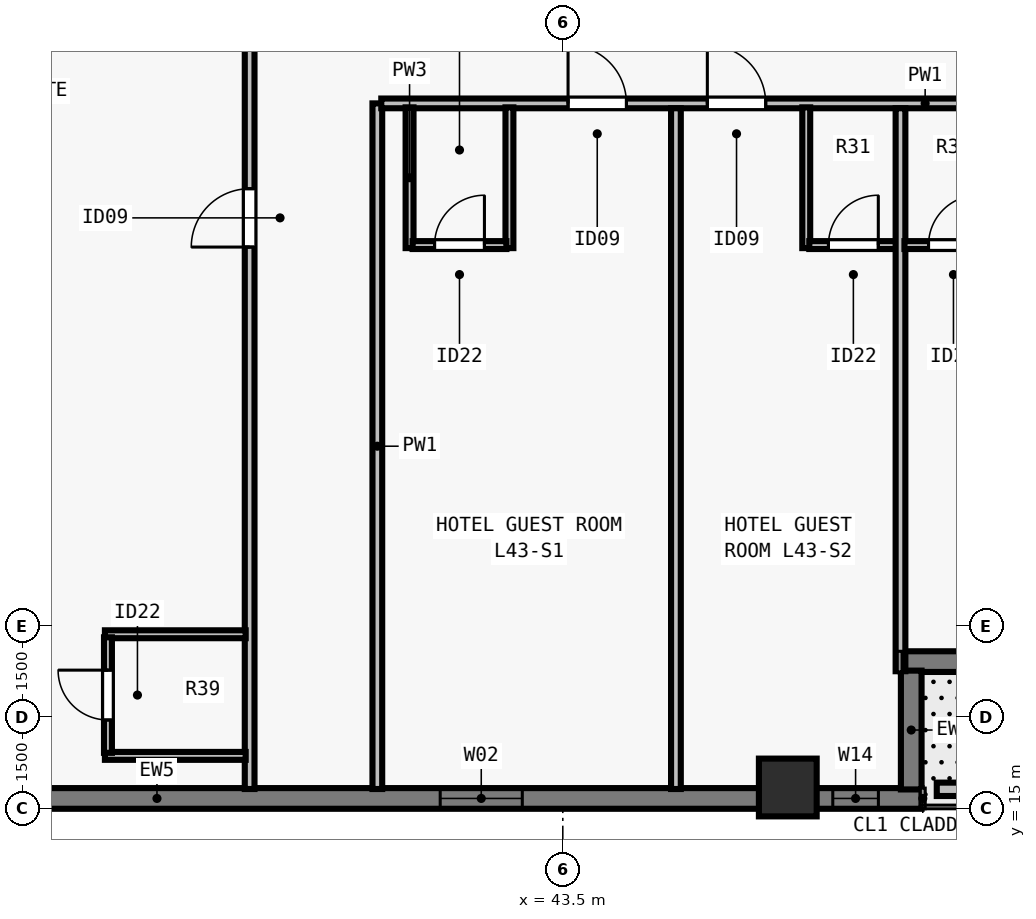
"""IFC4 building model, lengths in metres.
Left out: names, types, materials, properties, quantities, classifications, styles, units other than length and angle.
Written with IfcOpenShell. Run it as: python <this file> out.ifc"""

import sys

from ifc_helpers import new_model, si_unit, direction, frame, frame_2d, origin, origin_2d, place, context, subcontext, project, spatial, rectangle, extrude, element, fill, save


model = new_model("IFC4")
c1 = context("Model", 3, precision=1e-05, world=origin(), true_north=direction((0.0, 1.0)))
c2 = subcontext(c1, "Body", "Model", "MODEL_VIEW")
j1 = project(units=[si_unit("LENGTHUNIT", "METRE"), si_unit("PLANEANGLEUNIT", "RADIAN")], contexts=[c1])
p1 = place(None, origin())
s1 = spatial("IfcSite", under=j1, at=p1, CompositionType="ELEMENT")
p2 = place(p1, origin())
s2 = spatial("IfcBuilding", under=s1, at=p2, CompositionType="ELEMENT")
p3 = place(p2, frame((0.0, 0.0, 158.5)))
s3 = spatial("IfcBuildingStorey", under=s2, at=p3, CompositionType="ELEMENT", Elevation=158.5)
p4 = place(p3, frame((47.2, 15.35, 0.0), z_axis=(0.0, 0.0, 1.0), x_axis=(1.0, 0.0, 0.0)))
e1 = element("IfcColumn", 1, at=p4, inside=s3, PredefinedType="COLUMN", context=c2, shape_type="SweptSolid", body=[
    extrude(rectangle(XDim=0.95, YDim=0.95, at=origin_2d()), origin(), (0.0, 0.0, 1.0), 3.5),
])
p5 = place(p3, frame((49.4, 15.17, 0.0), z_axis=(0.0, 0.0, 1.0), x_axis=(-1.0, 0.0, 0.0)))
e2 = element("IfcWall", 2, at=p5, inside=s3, PredefinedType="SOLIDWALL", context=c2, shape_type="SweptSolid", body=[
    extrude(rectangle(XDim=17.082, YDim=0.34, at=frame_2d((8.541, 0.0))), origin(), (0.0, 0.0, 1.0), 3.28),
])
p6 = place(p5, frame((6.566, 0.0, 0.8)))
e3 = element("IfcOpeningElement", 3, at=p6, cuts=e2, PredefinedType="OPENING", context=c2, shape_type="SweptSolid", body=[
    extrude(rectangle(XDim=1.35, YDim=1.66, at=frame_2d((0.675, 0.83))), frame((0.0, 0.18, 0.0), z_axis=(0.0, -1.0, 0.0), x_axis=(1.0, 0.0, 0.0)), (0.0, 0.0, 1.0), 0.36),
])
p7 = place(p5, frame((0.71, 0.0, 0.8)))
e4 = element("IfcOpeningElement", 4, at=p7, cuts=e2, PredefinedType="OPENING", context=c2, shape_type="SweptSolid", body=[
    extrude(rectangle(XDim=0.75, YDim=1.66, at=frame_2d((0.375, 0.83))), frame((0.0, 0.18, 0.0), z_axis=(0.0, -1.0, 0.0), x_axis=(1.0, 0.0, 0.0)), (0.0, 0.0, 1.0), 0.36),
])
p8 = place(p3, frame((56.222, 17.42, 0.0), z_axis=(0.0, 0.0, 1.0), x_axis=(-1.0, 0.0, 0.0)))
e5 = element("IfcWall", 5, at=p8, inside=s3, PredefinedType="SOLIDWALL", context=c2, shape_type="SweptSolid", body=[
    extrude(rectangle(XDim=7.162, YDim=0.34, at=frame_2d((3.581, 0.0))), origin(), (0.0, 0.0, 1.0), 3.28),
])
p9 = place(p8, frame((3.779, 0.0, 0.0)))
e6 = element("IfcOpeningElement", 6, at=p9, cuts=e5, PredefinedType="OPENING", context=c2, shape_type="SweptSolid", body=[
    extrude(rectangle(XDim=1.0, YDim=2.15, at=frame_2d((0.5, 1.075))), frame((0.0, 0.18, 0.0), z_axis=(0.0, -1.0, 0.0), x_axis=(1.0, 0.0, 0.0)), (0.0, 0.0, 1.0), 0.36),
])
p10 = place(p3, frame((49.23, 17.272, 0.0), z_axis=(0.0, 0.0, 1.0), x_axis=(0.0, -1.0, 0.0)))
e7 = element("IfcWall", 7, at=p10, inside=s3, PredefinedType="SOLIDWALL", context=c2, shape_type="SweptSolid", body=[
    extrude(rectangle(XDim=1.954, YDim=0.34, at=frame_2d((0.977, 0.0))), origin(), (0.0, 0.0, 1.0), 3.28),
])
p11 = place(p3, frame((49.65, 15.32, 0.0), z_axis=(0.0, 0.0, 1.0), x_axis=(1.0, 0.0, 0.0)))
e8 = element("IfcWall", 8, at=p11, inside=s3, PredefinedType="PARAPET", context=c2, shape_type="SweptSolid", body=[
    extrude(rectangle(XDim=1.3, YDim=0.22, at=frame_2d((0.65, 0.0))), origin(), (0.0, 0.0, 1.0), 0.55),
])
p12 = place(p3, frame((38.35, 15.325, 0.0), z_axis=(0.0, 0.0, 1.0), x_axis=(0.0, 1.0, 0.0)))
e9 = element("IfcWall", 9, at=p12, inside=s3, PredefinedType="PARTITIONING", context=c2, shape_type="SweptSolid", body=[
    extrude(rectangle(XDim=47.35, YDim=0.16, at=frame_2d((23.675, 0.0))), origin(), (0.0, 0.0, 1.0), 2.555),
])
p13 = place(p12, frame((8.912, 0.0, 0.0)))
e10 = element("IfcOpeningElement", 10, at=p13, cuts=e9, PredefinedType="OPENING", context=c2, shape_type="SweptSolid", body=[
    extrude(rectangle(XDim=0.96, YDim=2.15, at=frame_2d((0.48, 1.075))), frame((0.0, 0.09, 0.0), z_axis=(0.0, -1.0, 0.0), x_axis=(1.0, 0.0, 0.0)), (0.0, 0.0, 1.0), 0.18),
])
p14 = place(p12, frame((24.312, 0.0, 0.0)))
e11 = element("IfcOpeningElement", 11, at=p14, cuts=e9, PredefinedType="OPENING", context=c2, shape_type="SweptSolid", body=[
    extrude(rectangle(XDim=0.96, YDim=2.15, at=frame_2d((0.48, 1.075))), frame((0.0, 0.09, 0.0), z_axis=(0.0, -1.0, 0.0), x_axis=(1.0, 0.0, 0.0)), (0.0, 0.0, 1.0), 0.18),
])
p15 = place(p12, frame((39.895, 0.0, 0.0)))
e12 = element("IfcOpeningElement", 12, at=p15, cuts=e9, PredefinedType="OPENING", context=c2, shape_type="SweptSolid", body=[
    extrude(rectangle(XDim=0.96, YDim=2.15, at=frame_2d((0.48, 1.075))), frame((0.0, 0.09, 0.0), z_axis=(0.0, -1.0, 0.0), x_axis=(1.0, 0.0, 0.0)), (0.0, 0.0, 1.0), 0.18),
])
p16 = place(p3, frame((40.45, 15.325, 0.0), z_axis=(0.0, 0.0, 1.0), x_axis=(0.0, 1.0, 0.0)))
e13 = element("IfcWall", 13, at=p16, inside=s3, PredefinedType="PARTITIONING", context=c2, shape_type="SweptSolid", body=[
    extrude(rectangle(XDim=11.275, YDim=0.16, at=frame_2d((5.638, 0.0))), origin(), (0.0, 0.0, 1.0), 2.555),
])
p17 = place(p3, frame((40.515, 26.6, 0.0), z_axis=(0.0, 0.0, 1.0), x_axis=(1.0, 0.0, 0.0)))
e14 = element("IfcWall", 14, at=p17, inside=s3, PredefinedType="PARTITIONING", context=c2, shape_type="SweptSolid", body=[
    extrude(rectangle(XDim=22.07, YDim=0.16, at=frame_2d((11.035, 0.0))), origin(), (0.0, 0.0, 1.0), 3.28),
])
p18 = place(p17, frame((3.072, 0.0, 0.0)))
e15 = element("IfcOpeningElement", 15, at=p18, cuts=e14, PredefinedType="OPENING", context=c2, shape_type="SweptSolid", body=[
    extrude(rectangle(XDim=0.96, YDim=2.15, at=frame_2d((0.48, 1.075))), frame((0.0, 0.09, 0.0), z_axis=(0.0, -1.0, 0.0), x_axis=(1.0, 0.0, 0.0)), (0.0, 0.0, 1.0), 0.18),
])
p19 = place(p17, frame((5.362, 0.0, 0.0)))
e16 = element("IfcOpeningElement", 16, at=p19, cuts=e14, PredefinedType="OPENING", context=c2, shape_type="SweptSolid", body=[
    extrude(rectangle(XDim=0.96, YDim=2.15, at=frame_2d((0.48, 1.075))), frame((0.0, 0.09, 0.0), z_axis=(0.0, -1.0, 0.0), x_axis=(1.0, 0.0, 0.0)), (0.0, 0.0, 1.0), 0.18),
])
p20 = place(p17, frame((11.566, 0.0, 0.0)))
e17 = element("IfcOpeningElement", 17, at=p20, cuts=e14, PredefinedType="OPENING", context=c2, shape_type="SweptSolid", body=[
    extrude(rectangle(XDim=0.96, YDim=2.15, at=frame_2d((0.48, 1.075))), frame((0.0, 0.09, 0.0), z_axis=(0.0, -1.0, 0.0), x_axis=(1.0, 0.0, 0.0)), (0.0, 0.0, 1.0), 0.18),
])
p21 = place(p17, frame((14.178, 0.0, 0.0)))
e18 = element("IfcOpeningElement", 18, at=p21, cuts=e14, PredefinedType="OPENING", context=c2, shape_type="SweptSolid", body=[
    extrude(rectangle(XDim=0.96, YDim=2.15, at=frame_2d((0.48, 1.075))), frame((0.0, 0.09, 0.0), z_axis=(0.0, -1.0, 0.0), x_axis=(1.0, 0.0, 0.0)), (0.0, 0.0, 1.0), 0.18),
])
p22 = place(p17, frame((20.099, 0.0, 0.0)))
e19 = element("IfcOpeningElement", 19, at=p22, cuts=e14, PredefinedType="OPENING", context=c2, shape_type="SweptSolid", body=[
    extrude(rectangle(XDim=0.96, YDim=2.15, at=frame_2d((0.48, 1.075))), frame((0.0, 0.09, 0.0), z_axis=(0.0, -1.0, 0.0), x_axis=(1.0, 0.0, 0.0)), (0.0, 0.0, 1.0), 0.18),
])
for number, where, z_axis, x_axis in (
    (20, (40.98, 24.22, 0.0), (0.0, 0.0, 1.0), (0.0, 1.0, 0.0)),
    (21, (42.622, 24.22, 0.0), (0.0, 0.0, 1.0), (0.0, 1.0, 0.0)),
):
    element("IfcWall", number, at=place(p3, frame(where, z_axis=z_axis, x_axis=x_axis)), inside=s3, PredefinedType="PLUMBINGWALL", context=c2, shape_type="SweptSolid", body=[
        extrude(rectangle(XDim=2.315, YDim=0.13, at=frame_2d((1.157, 0.0))), origin(), (0.0, 0.0, 1.0), 3.28),
    ])
p23 = place(p3, frame((41.03, 24.27, 0.0), z_axis=(0.0, 0.0, 1.0), x_axis=(1.0, 0.0, 0.0)))
e22 = element("IfcWall", 22, at=p23, inside=s3, PredefinedType="PLUMBINGWALL", context=c2, shape_type="SweptSolid", body=[
    extrude(rectangle(XDim=1.542, YDim=0.13, at=frame_2d((0.771, 0.0))), origin(), (0.0, 0.0, 1.0), 3.28),
])
p24 = place(p23, frame((0.361, 0.0, 0.0)))
e23 = element("IfcOpeningElement", 23, at=p24, cuts=e22, PredefinedType="OPENING", context=c2, shape_type="SweptSolid", body=[
    extrude(rectangle(XDim=0.82, YDim=2.1, at=frame_2d((0.41, 1.05))), frame((0.0, 0.075, 0.0), z_axis=(0.0, -1.0, 0.0), x_axis=(1.0, 0.0, 0.0)), (0.0, 0.0, 1.0), 0.15),
])
p25 = place(p3, frame((45.361, 15.325, 0.0), z_axis=(0.0, 0.0, 1.0), x_axis=(0.0, 1.0, 0.0)))
e24 = element("IfcWall", 24, at=p25, inside=s3, PredefinedType="PARTITIONING", context=c2, shape_type="SweptSolid", body=[
    extrude(rectangle(XDim=11.195, YDim=0.16, at=frame_2d((5.598, 0.0))), origin(), (0.0, 0.0, 1.0), 3.28),
])
p26 = place(p3, frame((47.503, 24.22, 0.0), z_axis=(0.0, 0.0, 1.0), x_axis=(0.0, 1.0, 0.0)))
e25 = element("IfcWall", 25, at=p26, inside=s3, PredefinedType="PLUMBINGWALL", context=c2, shape_type="SweptSolid", body=[
    extrude(rectangle(XDim=2.315, YDim=0.13, at=frame_2d((1.157, 0.0))), origin(), (0.0, 0.0, 1.0), 3.28),
])
p27 = place(p3, frame((47.553, 24.27, 0.0), z_axis=(0.0, 0.0, 1.0), x_axis=(1.0, 0.0, 0.0)))
e26 = element("IfcWall", 26, at=p27, inside=s3, PredefinedType="PLUMBINGWALL", context=c2, shape_type="SweptSolid", body=[
    extrude(rectangle(XDim=1.55, YDim=0.13, at=frame_2d((0.775, 0.0))), origin(), (0.0, 0.0, 1.0), 3.28),
])
p28 = place(p27, frame((0.315, 0.0, 0.0)))
e27 = element("IfcOpeningElement", 27, at=p28, cuts=e26, PredefinedType="OPENING", context=c2, shape_type="SweptSolid", body=[
    extrude(rectangle(XDim=0.82, YDim=2.1, at=frame_2d((0.41, 1.05))), frame((0.0, 0.075, 0.0), z_axis=(0.0, -1.0, 0.0), x_axis=(1.0, 0.0, 0.0)), (0.0, 0.0, 1.0), 0.15),
])
p29 = place(p3, frame((49.053, 17.262, 0.0), z_axis=(0.0, 0.0, 1.0), x_axis=(0.0, 1.0, 0.0)))
e28 = element("IfcWall", 28, at=p29, inside=s3, PredefinedType="PARTITIONING", context=c2, shape_type="SweptSolid", body=[
    extrude(rectangle(XDim=9.258, YDim=0.16, at=frame_2d((4.629, 0.0))), origin(), (0.0, 0.0, 1.0), 2.896),
])
p30 = place(p3, frame((49.118, 24.27, 0.0), z_axis=(0.0, 0.0, 1.0), x_axis=(1.0, 0.0, 0.0)))
e29 = element("IfcWall", 29, at=p30, inside=s3, PredefinedType="PLUMBINGWALL", context=c2, shape_type="SweptSolid", body=[
    extrude(rectangle(XDim=1.627, YDim=0.13, at=frame_2d((0.813, 0.0))), origin(), (0.0, 0.0, 1.0), 3.28),
])
p31 = place(p30, frame((0.396, 0.0, 0.0)))
e30 = element("IfcOpeningElement", 30, at=p31, cuts=e29, PredefinedType="OPENING", context=c2, shape_type="SweptSolid", body=[
    extrude(rectangle(XDim=0.82, YDim=2.1, at=frame_2d((0.41, 1.05))), frame((0.0, 0.075, 0.0), z_axis=(0.0, -1.0, 0.0), x_axis=(1.0, 0.0, 0.0)), (0.0, 0.0, 1.0), 0.15),
])
for number, where, z_axis, x_axis in (
    (31, (35.97, 15.87, 0.0), (0.0, 0.0, 1.0), (1.0, 0.0, 0.0)),
    (32, (35.97, 17.87, 0.0), (0.0, 0.0, 1.0), (1.0, 0.0, 0.0)),
):
    element("IfcWall", number, at=place(p3, frame(where, z_axis=z_axis, x_axis=x_axis)), inside=s3, PredefinedType="PLUMBINGWALL", context=c2, shape_type="SweptSolid", body=[
        extrude(rectangle(XDim=2.315, YDim=0.13, at=frame_2d((1.157, 0.0))), origin(), (0.0, 0.0, 1.0), 3.28),
    ])
p32 = place(p3, frame((36.02, 15.92, 0.0), z_axis=(0.0, 0.0, 1.0), x_axis=(0.0, 1.0, 0.0)))
e33 = element("IfcWall", 33, at=p32, inside=s3, PredefinedType="PLUMBINGWALL", context=c2, shape_type="SweptSolid", body=[
    extrude(rectangle(XDim=1.9, YDim=0.13, at=frame_2d((0.95, 0.0))), origin(), (0.0, 0.0, 1.0), 3.28),
])
p33 = place(p32, frame((0.54, 0.0, 0.0)))
e34 = element("IfcOpeningElement", 34, at=p33, cuts=e33, PredefinedType="OPENING", context=c2, shape_type="SweptSolid", body=[
    extrude(rectangle(XDim=0.82, YDim=2.1, at=frame_2d((0.41, 1.05))), frame((0.0, 0.075, 0.0), z_axis=(0.0, -1.0, 0.0), x_axis=(1.0, 0.0, 0.0)), (0.0, 0.0, 1.0), 0.15),
])
p34 = place(p6, origin())
e35 = element("IfcWindow", 35, at=p34, inside=s3, PartitioningType="SINGLE_PANEL", PredefinedType="WINDOW", context=c2, shape_type="SweptSolid", body=[
    extrude(rectangle(XDim=1.35, YDim=1.66, at=frame_2d((0.675, 0.83))), frame((0.0, -0.05, 0.0), z_axis=(0.0, -1.0, 0.0), x_axis=(1.0, 0.0, 0.0)), (0.0, 0.0, 1.0), 0.06),
])
fill(e3, e35)
p35 = place(p7, origin())
e36 = element("IfcWindow", 36, at=p35, inside=s3, PartitioningType="SINGLE_PANEL", PredefinedType="WINDOW", context=c2, shape_type="SweptSolid", body=[
    extrude(rectangle(XDim=0.75, YDim=1.66, at=frame_2d((0.375, 0.83))), frame((0.0, -0.04, 0.0), z_axis=(0.0, -1.0, 0.0), x_axis=(1.0, 0.0, 0.0)), (0.0, 0.0, 1.0), 0.06),
])
fill(e4, e36)
p36 = place(p24, origin())
e37 = element("IfcDoor", 37, at=p36, inside=s3, OperationType="SINGLE_SWING_RIGHT", PredefinedType="DOOR", context=c2, shape_type="SweptSolid", body=[
    extrude(rectangle(XDim=0.82, YDim=2.1, at=frame_2d((0.41, 1.05))), frame((0.0, 0.025, 0.0), z_axis=(0.0, -1.0, 0.0), x_axis=(1.0, 0.0, 0.0)), (0.0, 0.0, 1.0), 0.05),
])
fill(e23, e37)
p37 = place(p18, origin())
e38 = element("IfcDoor", 38, at=p37, inside=s3, OperationType="SINGLE_SWING_LEFT", PredefinedType="DOOR", context=c2, shape_type="SweptSolid", body=[
    extrude(rectangle(XDim=0.96, YDim=2.15, at=frame_2d((0.48, 1.075))), frame((0.0, 0.025, 0.0), z_axis=(0.0, -1.0, 0.0), x_axis=(1.0, 0.0, 0.0)), (0.0, 0.0, 1.0), 0.05),
])
fill(e15, e38)
p38 = place(p28, origin())
e39 = element("IfcDoor", 39, at=p38, inside=s3, OperationType="SINGLE_SWING_RIGHT", PredefinedType="DOOR", context=c2, shape_type="SweptSolid", body=[
    extrude(rectangle(XDim=0.82, YDim=2.1, at=frame_2d((0.41, 1.05))), frame((0.0, 0.025, 0.0), z_axis=(0.0, -1.0, 0.0), x_axis=(1.0, 0.0, 0.0)), (0.0, 0.0, 1.0), 0.05),
])
fill(e27, e39)
p39 = place(p19, origin())
e40 = element("IfcDoor", 40, at=p39, inside=s3, OperationType="SINGLE_SWING_LEFT", PredefinedType="DOOR", context=c2, shape_type="SweptSolid", body=[
    extrude(rectangle(XDim=0.96, YDim=2.15, at=frame_2d((0.48, 1.075))), frame((0.0, 0.025, 0.0), z_axis=(0.0, -1.0, 0.0), x_axis=(1.0, 0.0, 0.0)), (0.0, 0.0, 1.0), 0.05),
])
fill(e16, e40)
p40 = place(p31, origin())
e41 = element("IfcDoor", 41, at=p40, inside=s3, OperationType="SINGLE_SWING_RIGHT", PredefinedType="DOOR", context=c2, shape_type="SweptSolid", body=[
    extrude(rectangle(XDim=0.82, YDim=2.1, at=frame_2d((0.41, 1.05))), frame((0.0, 0.025, 0.0), z_axis=(0.0, -1.0, 0.0), x_axis=(1.0, 0.0, 0.0)), (0.0, 0.0, 1.0), 0.05),
])
fill(e30, e41)
p41 = place(p33, origin())
e42 = element("IfcDoor", 42, at=p41, inside=s3, OperationType="SINGLE_SWING_RIGHT", PredefinedType="DOOR", context=c2, shape_type="SweptSolid", body=[
    extrude(rectangle(XDim=0.82, YDim=2.1, at=frame_2d((0.41, 1.05))), frame((0.0, 0.025, 0.0), z_axis=(0.0, -1.0, 0.0), x_axis=(1.0, 0.0, 0.0)), (0.0, 0.0, 1.0), 0.05),
])
fill(e34, e42)
p42 = place(p13, origin())
e43 = element("IfcDoor", 43, at=p42, inside=s3, OperationType="SINGLE_SWING_LEFT", PredefinedType="DOOR", context=c2, shape_type="SweptSolid", body=[
    extrude(rectangle(XDim=0.96, YDim=2.15, at=frame_2d((0.48, 1.075))), frame((0.0, 0.025, 0.0), z_axis=(0.0, -1.0, 0.0), x_axis=(1.0, 0.0, 0.0)), (0.0, 0.0, 1.0), 0.05),
])
fill(e10, e43)
save(model, sys.argv[1])
